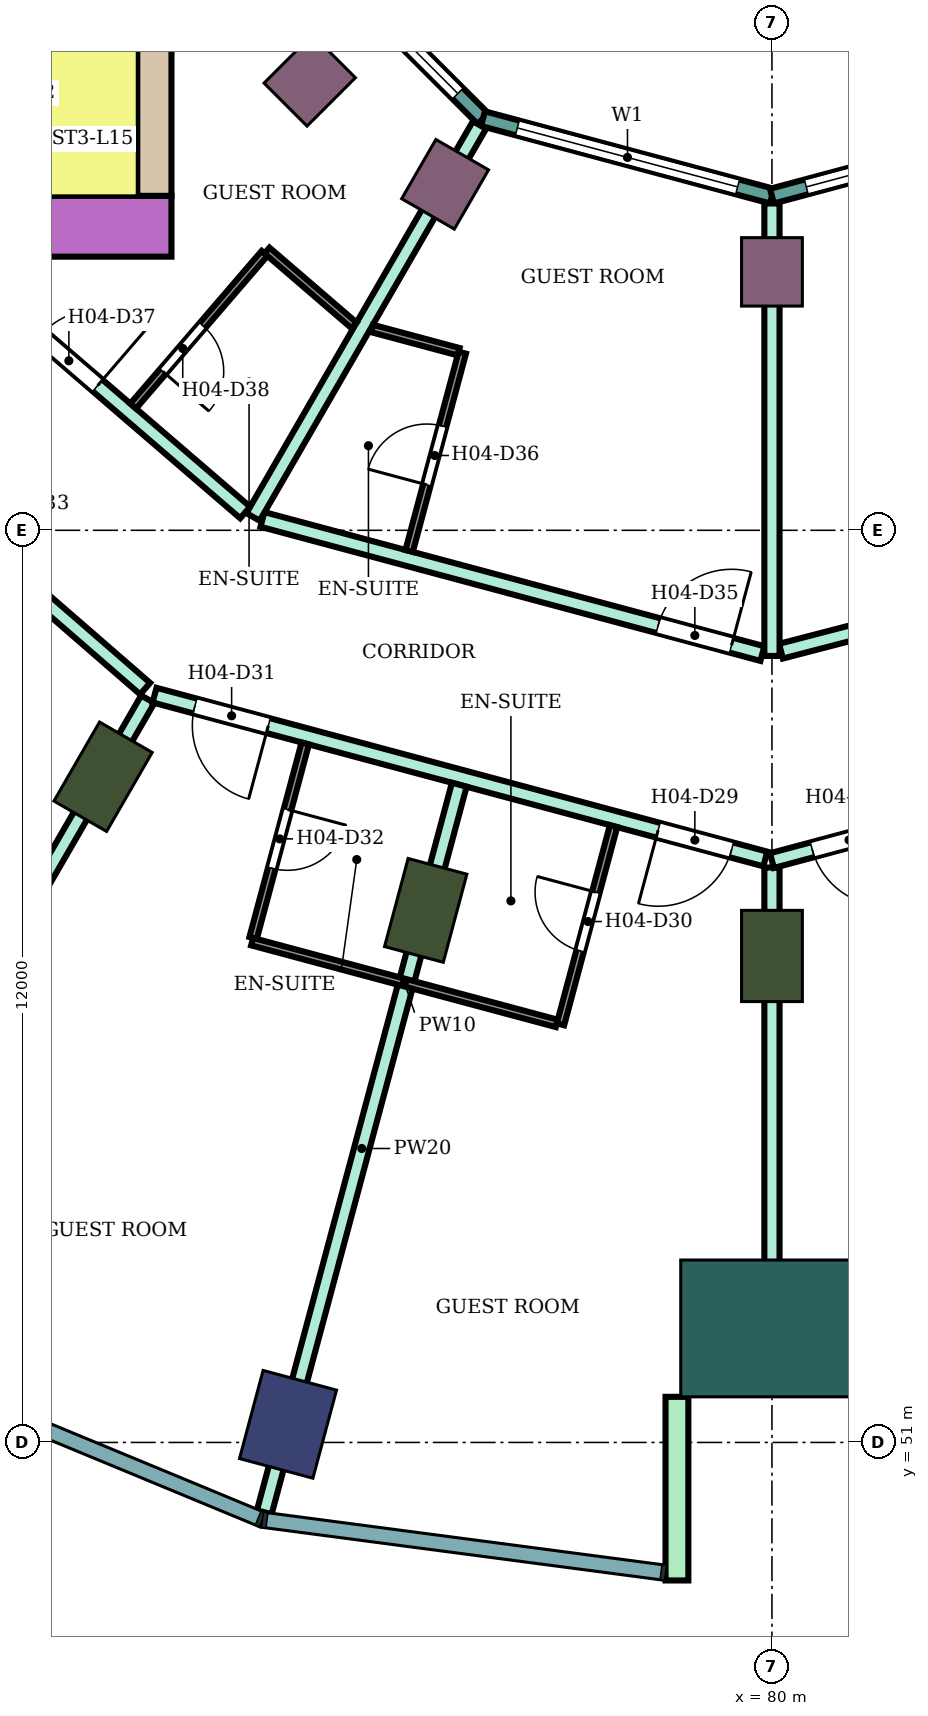
"""IFC4 building model, lengths in metres.
Left out: names, types, materials, properties, quantities, classifications, styles, units other than length and angle.
Written with IfcOpenShell. Run it as: python <this file> out.ifc"""

import sys

from ifc_helpers import new_model, si_unit, direction, frame, frame_2d, origin, origin_2d, place, context, subcontext, project, spatial, rectangle, extrude, element, fill, save


model = new_model("IFC4")
c1 = context("Model", 3, precision=1e-05, world=origin(), true_north=direction((0.0, 1.0)))
c2 = subcontext(c1, "Body", "Model", "MODEL_VIEW")
j1 = project(units=[si_unit("LENGTHUNIT", "METRE"), si_unit("PLANEANGLEUNIT", "RADIAN")], contexts=[c1])
p1 = place(None, origin())
s1 = spatial("IfcSite", under=j1, at=p1, CompositionType="ELEMENT")
p2 = place(p1, origin())
s2 = spatial("IfcBuilding", under=s1, at=p2, CompositionType="ELEMENT")
p3 = place(p2, frame((0.0, 0.0, 66.8)))
s3 = spatial("IfcBuildingStorey", under=s2, at=p3, CompositionType="ELEMENT", Elevation=66.8)
p4 = place(p3, frame((73.633, 51.238, 0.0), z_axis=(0.0, 0.0, 1.0), x_axis=(-0.258819045103, -0.965925826289, 0.0)))
e1 = element("IfcColumn", 1, at=p4, inside=s3, PredefinedType="COLUMN", context=c2, shape_type="SweptSolid", body=[
    extrude(rectangle(XDim=1.2, YDim=1.0, at=origin_2d()), origin(), (0.0, 0.0, 1.0), 3.8),
])
for number, where, z_axis, x_axis in (
    (2, (71.2, 59.758, 0.0), (0.0, 0.0, 1.0), (-0.5, -0.866, 0.0)),
    (3, (75.445, 58.0, 0.0), (0.0, 0.0, 1.0), (-0.259, -0.966, 0.0)),
    (4, (80.0, 57.4, 0.0), (0.0, 0.0, 1.0), (0.0, -1.0, 0.0)),
):
    element("IfcColumn", number, at=place(p3, frame(where, z_axis=z_axis, x_axis=x_axis)), inside=s3, PredefinedType="COLUMN", context=c2, shape_type="SweptSolid", body=[
        extrude(rectangle(XDim=1.2, YDim=0.8, at=origin_2d()), origin(), (0.0, 0.0, 1.0), 3.8),
    ])
for number, where, z_axis, x_axis in (
    (5, (73.919, 68.919, 0.0), (0.0, 0.0, 1.0), (-0.707, -0.707, 0.0)),
    (6, (75.7, 67.552, 0.0), (0.0, 0.0, 1.0), (-0.5, -0.866, 0.0)),
    (7, (80.0, 66.4, 0.0), (0.0, 0.0, 1.0), (0.0, -1.0, 0.0)),
):
    element("IfcColumn", number, at=place(p3, frame(where, z_axis=z_axis, x_axis=x_axis)), inside=s3, PredefinedType="COLUMN", context=c2, shape_type="SweptSolid", body=[
        extrude(rectangle(XDim=0.9, YDim=0.8, at=origin_2d()), origin(), (0.0, 0.0, 1.0), 3.8),
    ])
p5 = place(p3, frame((80.0, 52.5, 0.0), z_axis=(0.0, 0.0, 1.0), x_axis=(0.0, -1.0, 0.0)))
e8 = element("IfcColumn", 8, at=p5, inside=s3, PredefinedType="COLUMN", context=c2, shape_type="SweptSolid", body=[
    extrude(rectangle(XDim=1.8, YDim=2.4, at=origin_2d()), origin(), (0.0, 0.0, 1.0), 3.8),
])
p6 = place(p3, frame((72.1, 67.0, 0.0), z_axis=(0.0, 0.0, 1.0), x_axis=(-1.0, 0.0, 0.0)))
e9 = element("IfcWall", 9, at=p6, inside=s3, PredefinedType="SHEAR", context=c2, shape_type="SweptSolid", body=[
    extrude(rectangle(XDim=14.7, YDim=0.8, at=frame_2d((7.35, 0.0))), origin(), (0.0, 0.0, 1.0), 3.48),
])
p7 = place(p6, frame((4.2, 0.0, 0.0)))
e10 = element("IfcOpeningElement", 10, at=p7, cuts=e9, PredefinedType="OPENING", context=c2, shape_type="SweptSolid", body=[
    extrude(rectangle(XDim=2.4, YDim=2.4, at=frame_2d((1.2, 1.2))), frame((0.0, 0.41, 0.0), z_axis=(0.0, -1.0, 0.0), x_axis=(1.0, 0.0, 0.0)), (0.0, 0.0, 1.0), 0.82),
])
p8 = place(p3, frame((71.875, 75.0, 0.0), z_axis=(0.0, 0.0, 1.0), x_axis=(0.0, -1.0, 0.0)))
e11 = element("IfcWall", 11, at=p8, inside=s3, PredefinedType="SHEAR", context=c2, shape_type="SweptSolid", body=[
    extrude(rectangle(XDim=7.6, YDim=0.45, at=frame_2d((3.8, 0.0))), origin(), (0.0, 0.0, 1.0), 3.48),
])
p9 = place(p3, frame((78.75, 51.6, 0.0), z_axis=(0.0, 0.0, 1.0), x_axis=(0.0, -1.0, 0.0)))
e12 = element("IfcWall", 12, at=p9, inside=s3, PredefinedType="NOTDEFINED", context=c2, shape_type="SweptSolid", body=[
    extrude(rectangle(XDim=2.416, YDim=0.3, at=frame_2d((1.208, 0.0))), origin(), (0.0, 0.0, 1.0), 3.8),
])
p10 = place(p3, frame((73.415, 71.198, 0.0), z_axis=(0.0, 0.0, 1.0), x_axis=(0.707106781187, -0.707106781187, 0.0)))
e13 = element("IfcWall", 13, at=p10, inside=s3, PredefinedType="NOTDEFINED", context=c2, shape_type="SweptSolid", body=[
    extrude(rectangle(XDim=3.936, YDim=0.2, at=frame_2d((1.968, 0.0))), origin(), (0.0, 0.0, 1.0), 3.8),
])
p11 = place(p10, frame((0.468, 0.0, 0.9)))
e14 = element("IfcOpeningElement", 14, at=p11, cuts=e13, PredefinedType="OPENING", context=c2, shape_type="SweptSolid", body=[
    extrude(rectangle(XDim=3.0, YDim=2.3, at=frame_2d((1.5, 1.15))), frame((0.0, 0.11, 0.0), z_axis=(0.0, -1.0, 0.0), x_axis=(1.0, 0.0, 0.0)), (0.0, 0.0, 1.0), 0.22),
])
p12 = place(p3, frame((76.198, 68.415, 0.0), z_axis=(0.0, 0.0, 1.0), x_axis=(0.965933654434, -0.258789828301, 0.0)))
e15 = element("IfcWall", 15, at=p12, inside=s3, PredefinedType="NOTDEFINED", context=c2, shape_type="SweptSolid", body=[
    extrude(rectangle(XDim=3.936, YDim=0.2, at=frame_2d((1.968, 0.0))), origin(), (0.0, 0.0, 1.0), 3.8),
])
p13 = place(p12, frame((0.468, 0.0, 0.9)))
e16 = element("IfcOpeningElement", 16, at=p13, cuts=e15, PredefinedType="OPENING", context=c2, shape_type="SweptSolid", body=[
    extrude(rectangle(XDim=3.0, YDim=2.3, at=frame_2d((1.5, 1.15))), frame((0.0, 0.11, 0.0), z_axis=(0.0, -1.0, 0.0), x_axis=(1.0, 0.0, 0.0)), (0.0, 0.0, 1.0), 0.22),
])
p14 = place(p3, frame((80.0, 67.396, 0.0), z_axis=(0.0, 0.0, 1.0), x_axis=(0.965933654434, 0.258789828301, 0.0)))
e17 = element("IfcWall", 17, at=p14, inside=s3, PredefinedType="NOTDEFINED", context=c2, shape_type="SweptSolid", body=[
    extrude(rectangle(XDim=3.936, YDim=0.2, at=frame_2d((1.968, 0.0))), origin(), (0.0, 0.0, 1.0), 3.8),
])
p15 = place(p14, frame((0.468, 0.0, 0.9)))
e18 = element("IfcOpeningElement", 18, at=p15, cuts=e17, PredefinedType="OPENING", context=c2, shape_type="SweptSolid", body=[
    extrude(rectangle(XDim=3.0, YDim=2.3, at=frame_2d((1.5, 1.15))), frame((0.0, 0.11, 0.0), z_axis=(0.0, -1.0, 0.0), x_axis=(1.0, 0.0, 0.0)), (0.0, 0.0, 1.0), 0.22),
])
p16 = place(p3, frame((66.924, 65.111, 0.0), z_axis=(0.0, 0.0, 1.0), x_axis=(0.755023669255, -0.655697536113, 0.0)))
e19 = element("IfcWall", 19, at=p16, inside=s3, PredefinedType="PARTITIONING", context=c2, shape_type="SweptSolid", body=[
    extrude(rectangle(XDim=6.396, YDim=0.2, at=frame_2d((3.198, 0.0))), origin(), (0.0, 0.0, 1.0), 3.35),
])
p17 = place(p16, frame((2.658, 0.0, 0.0)))
e20 = element("IfcOpeningElement", 20, at=p17, cuts=e19, PredefinedType="OPENING", context=c2, shape_type="SweptSolid", body=[
    extrude(rectangle(XDim=1.8, YDim=2.1, at=frame_2d((0.9, 1.05))), frame((0.0, 0.11, 0.0), z_axis=(0.0, -1.0, 0.0), x_axis=(1.0, 0.0, 0.0)), (0.0, 0.0, 1.0), 0.22),
])
p18 = place(p3, frame((67.099, 52.661, 0.0), z_axis=(0.0, 0.0, 1.0), x_axis=(0.500234203776, 0.86589014394, 0.0)))
e21 = element("IfcWall", 21, at=p18, inside=s3, PredefinedType="PARTITIONING", context=c2, shape_type="SweptSolid", body=[
    extrude(rectangle(XDim=9.374, YDim=0.2, at=frame_2d((4.687, 0.0))), origin(), (0.0, 0.0, 1.0), 3.35),
])
p19 = place(p3, frame((69.158, 66.6, 0.0), z_axis=(0.0, 0.0, 1.0), x_axis=(0.757976058094, -0.652282373943, 0.0)))
e22 = element("IfcWall", 22, at=p19, inside=s3, PredefinedType="PARTITIONING", context=c2, shape_type="SweptSolid", body=[
    extrude(rectangle(XDim=5.16, YDim=0.2, at=frame_2d((2.58, 0.0))), origin(), (0.0, 0.0, 1.0), 3.35),
])
p20 = place(p19, frame((1.6, 0.0, 0.0)))
e23 = element("IfcOpeningElement", 23, at=p20, cuts=e22, PredefinedType="OPENING", context=c2, shape_type="SweptSolid", body=[
    extrude(rectangle(XDim=1.0, YDim=2.1, at=frame_2d((0.5, 1.05))), frame((0.0, 0.11, 0.0), z_axis=(0.0, -1.0, 0.0), x_axis=(1.0, 0.0, 0.0)), (0.0, 0.0, 1.0), 0.22),
])
p21 = place(p3, frame((71.877, 60.832, 0.0), z_axis=(0.0, 0.0, 1.0), x_axis=(0.965852509869, -0.259092510851, 0.0)))
e24 = element("IfcWall", 24, at=p21, inside=s3, PredefinedType="PARTITIONING", context=c2, shape_type="SweptSolid", body=[
    extrude(rectangle(XDim=8.32, YDim=0.2, at=frame_2d((4.16, 0.0))), origin(), (0.0, 0.0, 1.0), 3.35),
])
p22 = place(p21, frame((6.86, 0.0, 0.0)))
e25 = element("IfcOpeningElement", 25, at=p22, cuts=e24, PredefinedType="OPENING", context=c2, shape_type="SweptSolid", body=[
    extrude(rectangle(XDim=1.0, YDim=2.1, at=frame_2d((0.5, 1.05))), frame((0.0, 0.11, 0.0), z_axis=(0.0, -1.0, 0.0), x_axis=(1.0, 0.0, 0.0)), (0.0, 0.0, 1.0), 0.22),
])
p23 = place(p21, frame((0.55, 0.0, 0.0)))
e26 = element("IfcOpeningElement", 26, at=p23, cuts=e24, PredefinedType="OPENING", context=c2, shape_type="SweptSolid", body=[
    extrude(rectangle(XDim=1.0, YDim=2.1, at=frame_2d((0.5, 1.05))), frame((0.0, 0.11, 0.0), z_axis=(0.0, -1.0, 0.0), x_axis=(1.0, 0.0, 0.0)), (0.0, 0.0, 1.0), 0.22),
])
p24 = place(p3, frame((73.297, 63.143, 0.0), z_axis=(0.0, 0.0, 1.0), x_axis=(0.965859030528, -0.25906820173, 0.0)))
e27 = element("IfcWall", 27, at=p24, inside=s3, PredefinedType="PARTITIONING", context=c2, shape_type="SweptSolid", body=[
    extrude(rectangle(XDim=6.81, YDim=0.2, at=frame_2d((3.405, 0.0))), origin(), (0.0, 0.0, 1.0), 3.35),
])
p25 = place(p24, frame((5.39, 0.0, 0.0)))
e28 = element("IfcOpeningElement", 28, at=p25, cuts=e27, PredefinedType="OPENING", context=c2, shape_type="SweptSolid", body=[
    extrude(rectangle(XDim=1.0, YDim=2.1, at=frame_2d((0.5, 1.05))), frame((0.0, 0.11, 0.0), z_axis=(0.0, -1.0, 0.0), x_axis=(1.0, 0.0, 0.0)), (0.0, 0.0, 1.0), 0.22),
])
p26 = place(p3, frame((73.174, 63.176, 0.0), z_axis=(0.0, 0.0, 1.0), x_axis=(0.500257106344, 0.865876912472, 0.0)))
e29 = element("IfcWall", 29, at=p26, inside=s3, PredefinedType="PARTITIONING", context=c2, shape_type="SweptSolid", body=[
    extrude(rectangle(XDim=5.955, YDim=0.2, at=frame_2d((2.978, 0.0))), origin(), (0.0, 0.0, 1.0), 3.35),
])
p27 = place(p3, frame((73.321, 50.081, 0.0), z_axis=(0.0, 0.0, 1.0), x_axis=(0.258889198551, 0.965907025999, 0.0)))
e30 = element("IfcWall", 30, at=p27, inside=s3, PredefinedType="PARTITIONING", context=c2, shape_type="SweptSolid", body=[
    extrude(rectangle(XDim=9.909, YDim=0.2, at=frame_2d((4.955, 0.0))), origin(), (0.0, 0.0, 1.0), 3.35),
])
p28 = place(p3, frame((80.119, 61.41, 0.0), z_axis=(0.0, 0.0, 1.0), x_axis=(0.967823361235, 0.251630565408, 0.0)))
e31 = element("IfcWall", 31, at=p28, inside=s3, PredefinedType="PARTITIONING", context=c2, shape_type="SweptSolid", body=[
    extrude(rectangle(XDim=6.958, YDim=0.2, at=frame_2d((3.479, 0.0))), origin(), (0.0, 0.0, 1.0), 3.35),
])
p29 = place(p28, frame((2.529, 0.0, 0.0)))
e32 = element("IfcOpeningElement", 32, at=p29, cuts=e31, PredefinedType="OPENING", context=c2, shape_type="SweptSolid", body=[
    extrude(rectangle(XDim=1.8, YDim=2.1, at=frame_2d((0.9, 1.05))), frame((0.0, 0.11, 0.0), z_axis=(0.0, -1.0, 0.0), x_axis=(1.0, 0.0, 0.0)), (0.0, 0.0, 1.0), 0.22),
])
p30 = place(p3, frame((80.0, 51.8, 0.0), z_axis=(0.0, 0.0, 1.0), x_axis=(0.0, 1.0, 0.0)))
e33 = element("IfcWall", 33, at=p30, inside=s3, PredefinedType="PARTITIONING", context=c2, shape_type="SweptSolid", body=[
    extrude(rectangle(XDim=6.764, YDim=0.2, at=frame_2d((3.382, 0.0))), origin(), (0.0, 0.0, 1.0), 3.35),
])
p31 = place(p3, frame((80.0, 58.655, 0.0), z_axis=(0.0, 0.0, 1.0), x_axis=(0.965974635626, 0.258636817424, 0.0)))
e34 = element("IfcWall", 34, at=p31, inside=s3, PredefinedType="PARTITIONING", context=c2, shape_type="SweptSolid", body=[
    extrude(rectangle(XDim=8.36, YDim=0.2, at=frame_2d((4.18, 0.0))), origin(), (0.0, 0.0, 1.0), 3.35),
])
p32 = place(p31, frame((6.86, 0.0, 0.0)))
e35 = element("IfcOpeningElement", 35, at=p32, cuts=e34, PredefinedType="OPENING", context=c2, shape_type="SweptSolid", body=[
    extrude(rectangle(XDim=1.0, YDim=2.1, at=frame_2d((0.5, 1.05))), frame((0.0, 0.11, 0.0), z_axis=(0.0, -1.0, 0.0), x_axis=(1.0, 0.0, 0.0)), (0.0, 0.0, 1.0), 0.22),
])
p33 = place(p31, frame((0.55, 0.0, 0.0)))
e36 = element("IfcOpeningElement", 36, at=p33, cuts=e34, PredefinedType="OPENING", context=c2, shape_type="SweptSolid", body=[
    extrude(rectangle(XDim=1.0, YDim=2.1, at=frame_2d((0.5, 1.05))), frame((0.0, 0.11, 0.0), z_axis=(0.0, -1.0, 0.0), x_axis=(1.0, 0.0, 0.0)), (0.0, 0.0, 1.0), 0.22),
])
p34 = place(p3, frame((80.0, 61.347, 0.0), z_axis=(0.0, 0.0, 1.0), x_axis=(0.0, 1.0, 0.0)))
e37 = element("IfcWall", 37, at=p34, inside=s3, PredefinedType="PARTITIONING", context=c2, shape_type="SweptSolid", body=[
    extrude(rectangle(XDim=5.953, YDim=0.2, at=frame_2d((2.977, 0.0))), origin(), (0.0, 0.0, 1.0), 3.35),
])
p35 = place(p3, frame((71.596, 64.635, 0.0), z_axis=(0.0, 0.0, 1.0), x_axis=(0.652285007511, 0.757973791748, 0.0)))
e38 = element("IfcWall", 38, at=p35, inside=s3, PredefinedType="PARTITIONING", context=c2, shape_type="SweptSolid", body=[
    extrude(rectangle(XDim=2.65, YDim=0.1, at=frame_2d((1.325, 0.0))), origin(), (0.0, 0.0, 1.0), 3.35),
])
p36 = place(p35, frame((0.6, 0.0, 0.0)))
e39 = element("IfcOpeningElement", 39, at=p36, cuts=e38, PredefinedType="OPENING", context=c2, shape_type="SweptSolid", body=[
    extrude(rectangle(XDim=0.8, YDim=2.1, at=frame_2d((0.4, 1.05))), frame((0.0, 0.06, 0.0), z_axis=(0.0, -1.0, 0.0), x_axis=(1.0, 0.0, 0.0)), (0.0, 0.0, 1.0), 0.12),
])
p37 = place(p3, frame((73.174, 57.636, 0.0), z_axis=(0.0, 0.0, 1.0), x_axis=(0.258952498977, 0.96589005755, 0.0)))
e40 = element("IfcWall", 40, at=p37, inside=s3, PredefinedType="PARTITIONING", context=c2, shape_type="SweptSolid", body=[
    extrude(rectangle(XDim=2.65, YDim=0.1, at=frame_2d((1.325, 0.0))), origin(), (0.0, 0.0, 1.0), 3.35),
])
p38 = place(p37, frame((0.95, 0.0, 0.0)))
e41 = element("IfcOpeningElement", 41, at=p38, cuts=e40, PredefinedType="OPENING", context=c2, shape_type="SweptSolid", body=[
    extrude(rectangle(XDim=0.8, YDim=2.1, at=frame_2d((0.4, 1.05))), frame((0.0, 0.06, 0.0), z_axis=(0.0, -1.0, 0.0), x_axis=(1.0, 0.0, 0.0)), (0.0, 0.0, 1.0), 0.12),
])
p39 = place(p3, frame((73.161, 57.588, 0.0), z_axis=(0.0, 0.0, 1.0), x_axis=(0.965858994467, -0.259068336173, 0.0)))
e42 = element("IfcWall", 42, at=p39, inside=s3, PredefinedType="PARTITIONING", context=c2, shape_type="SweptSolid", body=[
    extrude(rectangle(XDim=4.15, YDim=0.1, at=frame_2d((2.075, 0.0))), origin(), (0.0, 0.0, 1.0), 3.35),
])
p40 = place(p3, frame((73.357, 66.681, 0.0), z_axis=(0.0, 0.0, 1.0), x_axis=(0.758263469747, -0.651948242154, 0.0)))
e43 = element("IfcWall", 43, at=p40, inside=s3, PredefinedType="PARTITIONING", context=c2, shape_type="SweptSolid", body=[
    extrude(rectangle(XDim=1.511, YDim=0.1, at=frame_2d((0.755, 0.0))), origin(), (0.0, 0.0, 1.0), 3.35),
])
p41 = place(p3, frame((74.739, 65.655, 0.0), z_axis=(0.0, 0.0, 1.0), x_axis=(0.96591107063, -0.258874107695, 0.0)))
e44 = element("IfcWall", 44, at=p41, inside=s3, PredefinedType="PARTITIONING", context=c2, shape_type="SweptSolid", body=[
    extrude(rectangle(XDim=1.179, YDim=0.1, at=frame_2d((0.589, 0.0))), origin(), (0.0, 0.0, 1.0), 3.35),
])
p42 = place(p3, frame((75.227, 62.729, 0.0), z_axis=(0.0, 0.0, 1.0), x_axis=(0.258945475746, 0.965891940432, 0.0)))
e45 = element("IfcWall", 45, at=p42, inside=s3, PredefinedType="PARTITIONING", context=c2, shape_type="SweptSolid", body=[
    extrude(rectangle(XDim=2.7, YDim=0.1, at=frame_2d((1.35, 0.0))), origin(), (0.0, 0.0, 1.0), 3.35),
])
p43 = place(p42, frame((0.9, 0.0, 0.0)))
e46 = element("IfcOpeningElement", 46, at=p43, cuts=e45, PredefinedType="OPENING", context=c2, shape_type="SweptSolid", body=[
    extrude(rectangle(XDim=0.8, YDim=2.1, at=frame_2d((0.4, 1.05))), frame((0.0, 0.06, 0.0), z_axis=(0.0, -1.0, 0.0), x_axis=(1.0, 0.0, 0.0)), (0.0, 0.0, 1.0), 0.12),
])
p44 = place(p3, frame((77.218, 56.501, 0.0), z_axis=(0.0, 0.0, 1.0), x_axis=(0.258591408257, 0.965986792651, 0.0)))
e47 = element("IfcWall", 47, at=p44, inside=s3, PredefinedType="PARTITIONING", context=c2, shape_type="SweptSolid", body=[
    extrude(rectangle(XDim=2.699, YDim=0.1, at=frame_2d((1.35, 0.0))), origin(), (0.0, 0.0, 1.0), 3.35),
])
p45 = place(p44, frame((1.0, 0.0, 0.0)))
e48 = element("IfcOpeningElement", 48, at=p45, cuts=e47, PredefinedType="OPENING", context=c2, shape_type="SweptSolid", body=[
    extrude(rectangle(XDim=0.8, YDim=2.1, at=frame_2d((0.4, 1.05))), frame((0.0, 0.06, 0.0), z_axis=(0.0, -1.0, 0.0), x_axis=(1.0, 0.0, 0.0)), (0.0, 0.0, 1.0), 0.12),
])
p46 = place(p11, origin())
e49 = element("IfcWindow", 49, at=p46, inside=s3, PartitioningType="SINGLE_PANEL", PredefinedType="WINDOW", context=c2, shape_type="SweptSolid", body=[
    extrude(rectangle(XDim=3.0, YDim=2.3, at=frame_2d((1.5, 1.15))), frame((0.0, 0.03, 0.0), z_axis=(0.0, -1.0, 0.0), x_axis=(1.0, 0.0, 0.0)), (0.0, 0.0, 1.0), 0.06),
])
fill(e14, e49)
p47 = place(p13, origin())
e50 = element("IfcWindow", 50, at=p47, inside=s3, PartitioningType="SINGLE_PANEL", PredefinedType="WINDOW", context=c2, shape_type="SweptSolid", body=[
    extrude(rectangle(XDim=3.0, YDim=2.3, at=frame_2d((1.5, 1.15))), frame((0.0, 0.03, 0.0), z_axis=(0.0, -1.0, 0.0), x_axis=(1.0, 0.0, 0.0)), (0.0, 0.0, 1.0), 0.06),
])
fill(e16, e50)
p48 = place(p15, origin())
e51 = element("IfcWindow", 51, at=p48, inside=s3, PartitioningType="SINGLE_PANEL", PredefinedType="WINDOW", context=c2, shape_type="SweptSolid", body=[
    extrude(rectangle(XDim=3.0, YDim=2.3, at=frame_2d((1.5, 1.15))), frame((0.0, 0.03, 0.0), z_axis=(0.0, -1.0, 0.0), x_axis=(1.0, 0.0, 0.0)), (0.0, 0.0, 1.0), 0.06),
])
fill(e18, e51)
p49 = place(p33, frame((1.0, 0.0, 0.0), z_axis=(0.0, 0.0, 1.0), x_axis=(-1.0, 0.0, 0.0)))
e52 = element("IfcDoor", 52, at=p49, inside=s3, OperationType="SINGLE_SWING_LEFT", PredefinedType="DOOR", context=c2, shape_type="SweptSolid", body=[
    extrude(rectangle(XDim=1.0, YDim=2.1, at=frame_2d((0.5, 1.05))), frame((0.0, 0.025, 0.0), z_axis=(0.0, -1.0, 0.0), x_axis=(1.0, 0.0, 0.0)), (0.0, 0.0, 1.0), 0.05),
])
fill(e36, e52)
p50 = place(p22, frame((1.0, 0.0, 0.0), z_axis=(0.0, 0.0, 1.0), x_axis=(-1.0, 0.0, 0.0)))
e53 = element("IfcDoor", 53, at=p50, inside=s3, OperationType="SINGLE_SWING_RIGHT", PredefinedType="DOOR", context=c2, shape_type="SweptSolid", body=[
    extrude(rectangle(XDim=1.0, YDim=2.1, at=frame_2d((0.5, 1.05))), frame((0.0, 0.025, 0.0), z_axis=(0.0, -1.0, 0.0), x_axis=(1.0, 0.0, 0.0)), (0.0, 0.0, 1.0), 0.05),
])
fill(e25, e53)
p51 = place(p45, origin())
e54 = element("IfcDoor", 54, at=p51, inside=s3, OperationType="SINGLE_SWING_RIGHT", PredefinedType="DOOR", context=c2, shape_type="SweptSolid", body=[
    extrude(rectangle(XDim=0.8, YDim=2.1, at=frame_2d((0.4, 1.05))), frame((0.0, 0.025, 0.0), z_axis=(0.0, -1.0, 0.0), x_axis=(1.0, 0.0, 0.0)), (0.0, 0.0, 1.0), 0.05),
])
fill(e48, e54)
p52 = place(p23, frame((1.0, 0.0, 0.0), z_axis=(0.0, 0.0, 1.0), x_axis=(-1.0, 0.0, 0.0)))
e55 = element("IfcDoor", 55, at=p52, inside=s3, OperationType="SINGLE_SWING_LEFT", PredefinedType="DOOR", context=c2, shape_type="SweptSolid", body=[
    extrude(rectangle(XDim=1.0, YDim=2.1, at=frame_2d((0.5, 1.05))), frame((0.0, 0.025, 0.0), z_axis=(0.0, -1.0, 0.0), x_axis=(1.0, 0.0, 0.0)), (0.0, 0.0, 1.0), 0.05),
])
fill(e26, e55)
p53 = place(p38, frame((0.8, 0.0, 0.0), z_axis=(0.0, 0.0, 1.0), x_axis=(-1.0, 0.0, 0.0)))
e56 = element("IfcDoor", 56, at=p53, inside=s3, OperationType="SINGLE_SWING_LEFT", PredefinedType="DOOR", context=c2, shape_type="SweptSolid", body=[
    extrude(rectangle(XDim=0.8, YDim=2.1, at=frame_2d((0.4, 1.05))), frame((0.0, 0.025, 0.0), z_axis=(0.0, -1.0, 0.0), x_axis=(1.0, 0.0, 0.0)), (0.0, 0.0, 1.0), 0.05),
])
fill(e41, e56)
p54 = place(p25, origin())
e57 = element("IfcDoor", 57, at=p54, inside=s3, OperationType="SINGLE_SWING_RIGHT", PredefinedType="DOOR", context=c2, shape_type="SweptSolid", body=[
    extrude(rectangle(XDim=1.0, YDim=2.1, at=frame_2d((0.5, 1.05))), frame((0.0, 0.025, 0.0), z_axis=(0.0, -1.0, 0.0), x_axis=(1.0, 0.0, 0.0)), (0.0, 0.0, 1.0), 0.05),
])
fill(e28, e57)
p55 = place(p43, origin())
e58 = element("IfcDoor", 58, at=p55, inside=s3, OperationType="SINGLE_SWING_LEFT", PredefinedType="DOOR", context=c2, shape_type="SweptSolid", body=[
    extrude(rectangle(XDim=0.8, YDim=2.1, at=frame_2d((0.4, 1.05))), frame((0.0, 0.025, 0.0), z_axis=(0.0, -1.0, 0.0), x_axis=(1.0, 0.0, 0.0)), (0.0, 0.0, 1.0), 0.05),
])
fill(e46, e58)
p56 = place(p20, origin())
e59 = element("IfcDoor", 59, at=p56, inside=s3, OperationType="SINGLE_SWING_RIGHT", PredefinedType="DOOR", context=c2, shape_type="SweptSolid", body=[
    extrude(rectangle(XDim=1.0, YDim=2.1, at=frame_2d((0.5, 1.05))), frame((0.0, 0.025, 0.0), z_axis=(0.0, -1.0, 0.0), x_axis=(1.0, 0.0, 0.0)), (0.0, 0.0, 1.0), 0.05),
])
fill(e23, e59)
p57 = place(p36, frame((0.8, 0.0, 0.0), z_axis=(0.0, 0.0, 1.0), x_axis=(-1.0, 0.0, 0.0)))
e60 = element("IfcDoor", 60, at=p57, inside=s3, OperationType="SINGLE_SWING_RIGHT", PredefinedType="DOOR", context=c2, shape_type="SweptSolid", body=[
    extrude(rectangle(XDim=0.8, YDim=2.1, at=frame_2d((0.4, 1.05))), frame((0.0, 0.025, 0.0), z_axis=(0.0, -1.0, 0.0), x_axis=(1.0, 0.0, 0.0)), (0.0, 0.0, 1.0), 0.05),
])
fill(e39, e60)
save(model, sys.argv[1])
